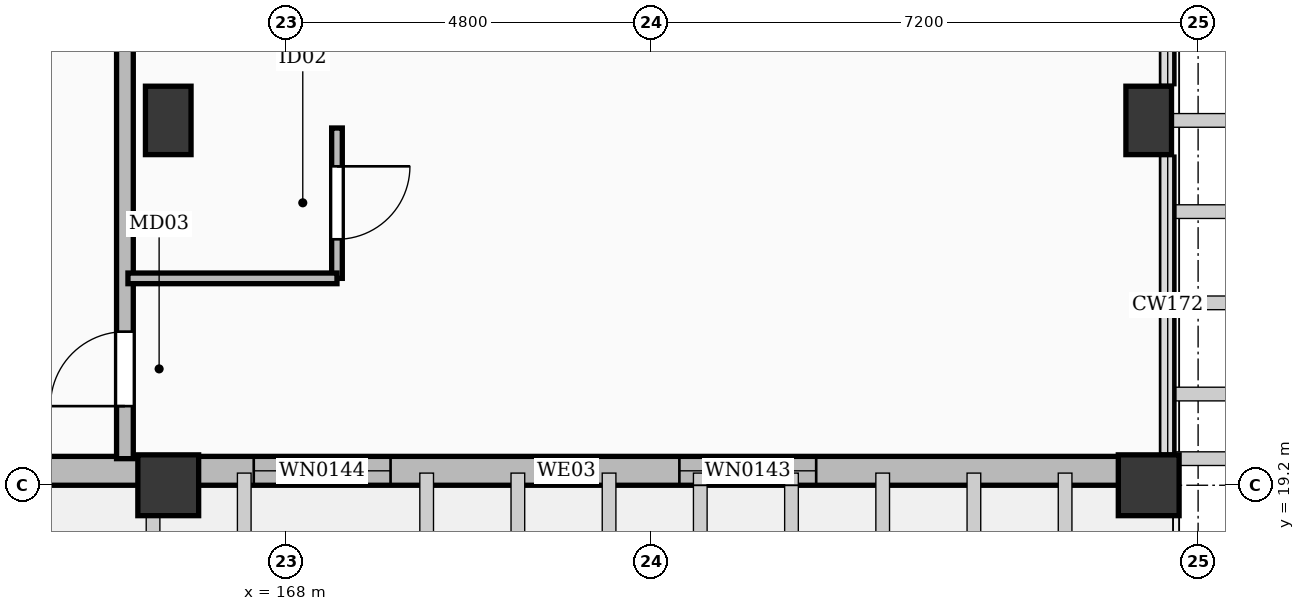
"""IFC4 building model, lengths in metres.
Left out: names, types, materials, properties, quantities, classifications, styles, units other than length and angle.
Written with IfcOpenShell. Run it as: python <this file> out.ifc"""

import sys

from ifc_helpers import new_model, si_unit, direction, frame, frame_2d, origin, origin_2d, place, context, subcontext, project, spatial, rectangle, extrude, element, fill, save


model = new_model("IFC4")
c1 = context("Model", 3, precision=1e-05, world=origin(), true_north=direction((0.0, 1.0)))
c2 = subcontext(c1, "Body", "Model", "MODEL_VIEW")
j1 = project(units=[si_unit("LENGTHUNIT", "METRE"), si_unit("PLANEANGLEUNIT", "RADIAN")], contexts=[c1])
p1 = place(None, origin())
s1 = spatial("IfcSite", under=j1, at=p1, CompositionType="ELEMENT")
p2 = place(p1, origin())
s2 = spatial("IfcBuilding", under=s1, at=p2, CompositionType="ELEMENT")
p3 = place(p2, frame((0.0, 0.0, 21.0)))
s3 = spatial("IfcBuildingStorey", under=s2, at=p3, CompositionType="ELEMENT", Elevation=21.0)
for number, where, z_axis, x_axis in (
    (1, (166.45, 19.2, 0.0), (0.0, 0.0, 1.0), (1.0, 0.0, 0.0)),
    (2, (179.35, 19.2, 0.0), (0.0, 0.0, 1.0), (1.0, 0.0, 0.0)),
):
    element("IfcColumn", number, at=place(p3, frame(where, z_axis=z_axis, x_axis=x_axis)), inside=s3, PredefinedType="COLUMN", context=c2, shape_type="SweptSolid", body=[
        extrude(rectangle(XDim=0.8, YDim=0.8, at=origin_2d()), origin(), (0.0, 0.0, 1.0), 3.6),
    ])
for number, where, z_axis, x_axis in (
    (3, (166.45, 24.0, -0.26), (0.0, 0.0, 1.0), (1.0, 0.0, 0.0)),
    (4, (179.35, 24.0, -0.26), (0.0, 0.0, 1.0), (1.0, 0.0, 0.0)),
):
    element("IfcColumn", number, at=place(p3, frame(where, z_axis=z_axis, x_axis=x_axis)), inside=s3, PredefinedType="COLUMN", context=c2, shape_type="SweptSolid", body=[
        extrude(rectangle(XDim=0.6, YDim=0.9, at=origin_2d()), origin(), (0.0, 0.0, 1.0), 3.86),
    ])
p4 = place(p3, frame((178.975, 19.39, 0.0), z_axis=(0.0, 0.0, 1.0), x_axis=(-1.0, 0.0, 0.0)))
e5 = element("IfcWall", 5, at=p4, inside=s3, PredefinedType="SOLIDWALL", context=c2, shape_type="SweptSolid", body=[
    extrude(rectangle(XDim=29.15, YDim=0.38, at=frame_2d((14.575, 0.0))), origin(), (0.0, 0.0, 1.0), 2.652),
])
p5 = place(p4, frame((14.15, 0.0, 0.0)))
e6 = element("IfcOpeningElement", 6, at=p5, cuts=e5, PredefinedType="OPENING", context=c2, shape_type="SweptSolid", body=[
    extrude(rectangle(XDim=1.6, YDim=2.25, at=frame_2d((0.8, 1.125))), frame((0.0, 0.202, 0.0), z_axis=(0.0, -1.0, 0.0), x_axis=(1.0, 0.0, 0.0)), (0.0, 0.0, 1.0), 0.404),
])
p6 = place(p4, frame((4.0, 0.0, 0.55)))
e7 = element("IfcOpeningElement", 7, at=p6, cuts=e5, PredefinedType="OPENING", context=c2, shape_type="SweptSolid", body=[
    extrude(rectangle(XDim=1.8, YDim=1.76, at=frame_2d((0.9, 0.88))), frame((0.0, 0.202, 0.0), z_axis=(0.0, -1.0, 0.0), x_axis=(1.0, 0.0, 0.0)), (0.0, 0.0, 1.0), 0.404),
])
p7 = place(p4, frame((9.6, 0.0, 0.55)))
e8 = element("IfcOpeningElement", 8, at=p7, cuts=e5, PredefinedType="OPENING", context=c2, shape_type="SweptSolid", body=[
    extrude(rectangle(XDim=1.8, YDim=1.76, at=frame_2d((0.9, 0.88))), frame((0.0, 0.202, 0.0), z_axis=(0.0, -1.0, 0.0), x_axis=(1.0, 0.0, 0.0)), (0.0, 0.0, 1.0), 0.404),
])
p8 = place(p4, frame((20.8, 0.0, 0.55)))
e9 = element("IfcOpeningElement", 9, at=p8, cuts=e5, PredefinedType="OPENING", context=c2, shape_type="SweptSolid", body=[
    extrude(rectangle(XDim=1.8, YDim=1.76, at=frame_2d((0.9, 0.88))), frame((0.0, 0.202, 0.0), z_axis=(0.0, -1.0, 0.0), x_axis=(1.0, 0.0, 0.0)), (0.0, 0.0, 1.0), 0.404),
])
p9 = place(p4, frame((25.4, 0.0, 0.55)))
e10 = element("IfcOpeningElement", 10, at=p9, cuts=e5, PredefinedType="OPENING", context=c2, shape_type="SweptSolid", body=[
    extrude(rectangle(XDim=1.8, YDim=1.76, at=frame_2d((0.9, 0.88))), frame((0.0, 0.202, 0.0), z_axis=(0.0, -1.0, 0.0), x_axis=(1.0, 0.0, 0.0)), (0.0, 0.0, 1.0), 0.404),
])
p10 = place(p3, frame((165.88, 19.55, 0.0), z_axis=(0.0, 0.0, 1.0), x_axis=(0.0, 1.0, 0.0)))
e11 = element("IfcWall", 11, at=p10, inside=s3, PredefinedType="PARTITIONING", context=c2, shape_type="SweptSolid", body=[
    extrude(rectangle(XDim=9.05, YDim=0.22, at=frame_2d((4.525, 0.0))), origin(), (0.0, 0.0, 1.0), 2.652),
])
p11 = place(p10, frame((0.691, 0.0, 0.0)))
e12 = element("IfcOpeningElement", 12, at=p11, cuts=e11, PredefinedType="OPENING", context=c2, shape_type="SweptSolid", body=[
    extrude(rectangle(XDim=0.98, YDim=2.15, at=frame_2d((0.49, 1.075))), frame((0.0, 0.122, 0.0), z_axis=(0.0, -1.0, 0.0), x_axis=(1.0, 0.0, 0.0)), (0.0, 0.0, 1.0), 0.244),
])
p12 = place(p3, frame((168.67, 21.922, 0.0), z_axis=(0.0, 0.0, 1.0), x_axis=(0.0, 1.0, 0.0)))
e13 = element("IfcWall", 13, at=p12, inside=s3, PredefinedType="PARTITIONING", context=c2, shape_type="SweptSolid", body=[
    extrude(rectangle(XDim=1.978, YDim=0.14, at=frame_2d((0.989, 0.0))), origin(), (0.0, 0.0, 1.0), 2.652),
])
p13 = place(p12, frame((0.514, 0.0, 0.0)))
e14 = element("IfcOpeningElement", 14, at=p13, cuts=e13, PredefinedType="OPENING", context=c2, shape_type="SweptSolid", body=[
    extrude(rectangle(XDim=0.96, YDim=2.12, at=frame_2d((0.48, 1.06))), frame((0.0, 0.082, 0.0), z_axis=(0.0, -1.0, 0.0), x_axis=(1.0, 0.0, 0.0)), (0.0, 0.0, 1.0), 0.164),
])
p14 = place(p3, frame((165.92, 21.922, 0.0), z_axis=(0.0, 0.0, 1.0), x_axis=(1.0, 0.0, 0.0)))
e15 = element("IfcWall", 15, at=p14, inside=s3, PredefinedType="PARTITIONING", context=c2, shape_type="SweptSolid", body=[
    extrude(rectangle(XDim=2.75, YDim=0.14, at=frame_2d((1.375, 0.0))), origin(), (0.0, 0.0, 1.0), 2.652),
])
p15 = place(p6, origin())
e16 = element("IfcWindow", 16, at=p15, inside=s3, PartitioningType="SINGLE_PANEL", PredefinedType="WINDOW", context=c2, shape_type="SweptSolid", body=[
    extrude(rectangle(XDim=1.8, YDim=1.76, at=frame_2d((0.9, 0.88))), frame((0.0, 0.03, 0.0), z_axis=(0.0, -1.0, 0.0), x_axis=(1.0, 0.0, 0.0)), (0.0, 0.0, 1.0), 0.06),
])
fill(e7, e16)
p16 = place(p7, origin())
e17 = element("IfcWindow", 17, at=p16, inside=s3, PartitioningType="SINGLE_PANEL", PredefinedType="WINDOW", context=c2, shape_type="SweptSolid", body=[
    extrude(rectangle(XDim=1.8, YDim=1.76, at=frame_2d((0.9, 0.88))), frame((0.0, 0.03, 0.0), z_axis=(0.0, -1.0, 0.0), x_axis=(1.0, 0.0, 0.0)), (0.0, 0.0, 1.0), 0.06),
])
fill(e8, e17)
p17 = place(p11, origin())
e18 = element("IfcDoor", 18, at=p17, inside=s3, OperationType="SINGLE_SWING_LEFT", PredefinedType="DOOR", context=c2, shape_type="SweptSolid", body=[
    extrude(rectangle(XDim=0.98, YDim=2.15, at=frame_2d((0.49, 1.075))), frame((0.0, 0.025, 0.0), z_axis=(0.0, -1.0, 0.0), x_axis=(1.0, 0.0, 0.0)), (0.0, 0.0, 1.0), 0.05),
])
fill(e12, e18)
p18 = place(p13, frame((0.96, 0.0, 0.0), z_axis=(0.0, 0.0, 1.0), x_axis=(-1.0, 0.0, 0.0)))
e19 = element("IfcDoor", 19, at=p18, inside=s3, OperationType="SINGLE_SWING_RIGHT", PredefinedType="DOOR", context=c2, shape_type="SweptSolid", body=[
    extrude(rectangle(XDim=0.96, YDim=2.12, at=frame_2d((0.48, 1.06))), frame((0.0, 0.025, 0.0), z_axis=(0.0, -1.0, 0.0), x_axis=(1.0, 0.0, 0.0)), (0.0, 0.0, 1.0), 0.05),
])
fill(e14, e19)
save(model, sys.argv[1])
